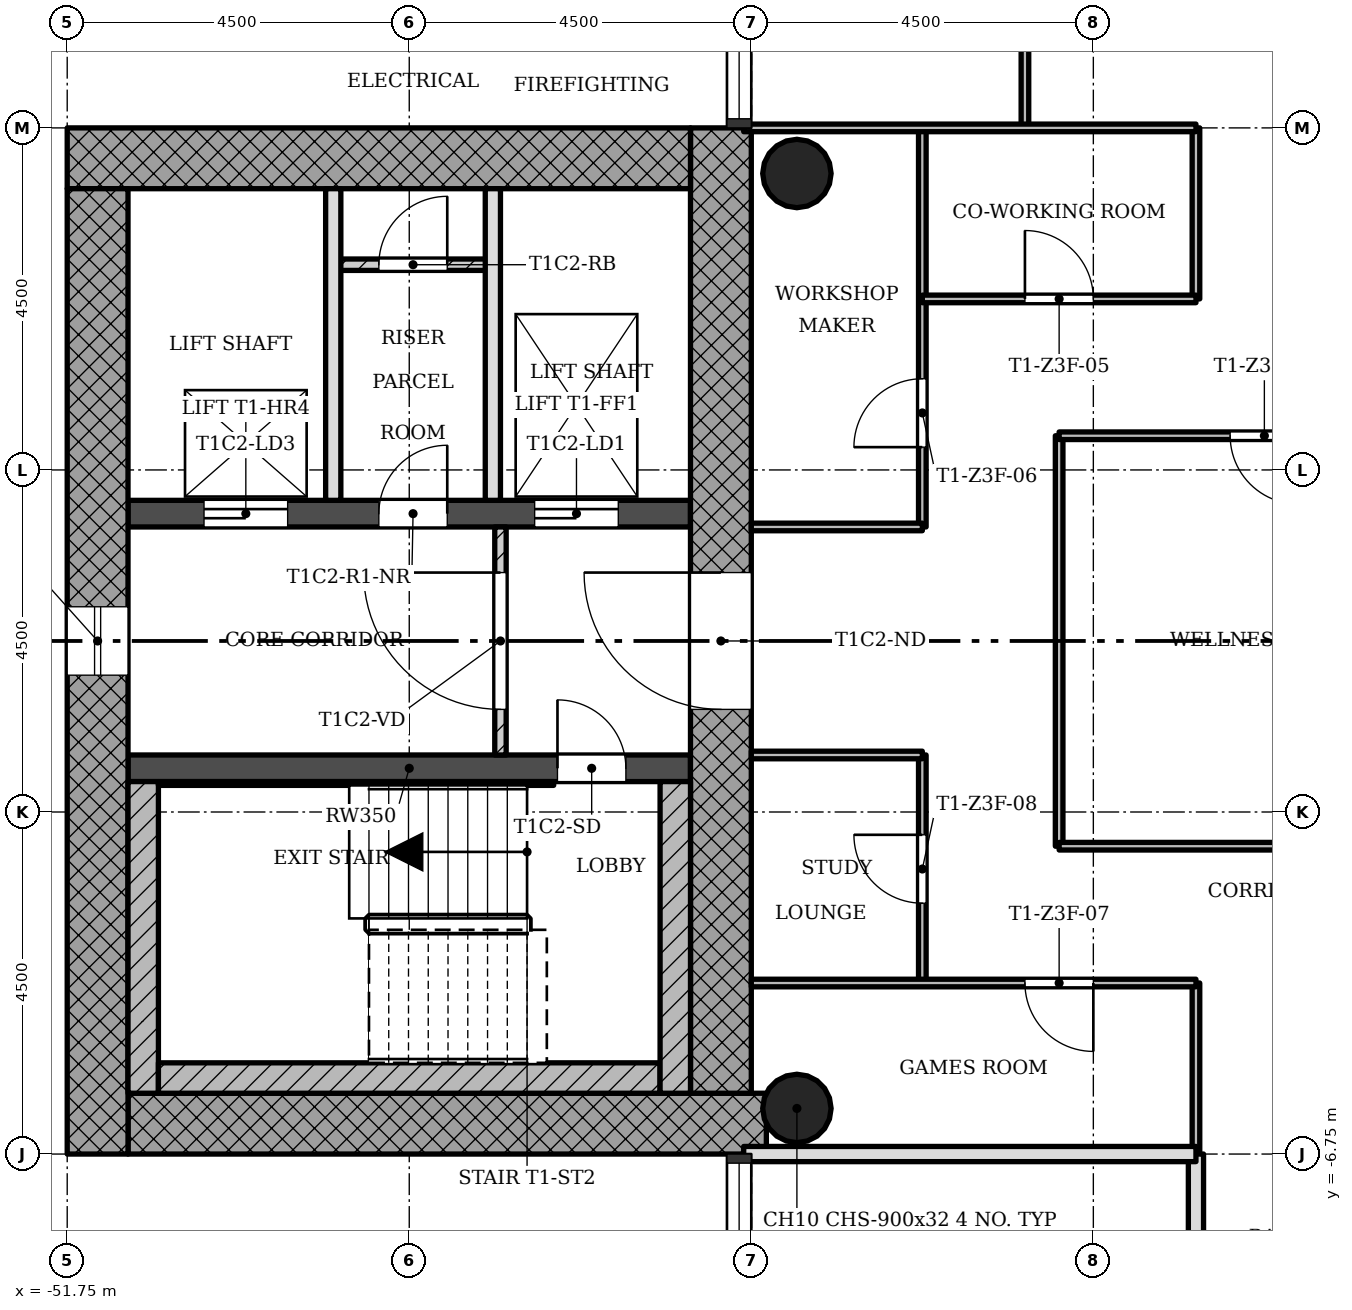
"""IFC4 building model, lengths in metres.
Left out: names, types, materials, properties, quantities, classifications, styles, units other than length and angle.
Written with IfcOpenShell. Run it as: python <this file> out.ifc"""

import sys

from ifc_helpers import new_model, si_unit, direction, frame, frame_2d, origin, origin_2d, place, context, subcontext, project, spatial, rectangle, hollow_circle, extrude, element, fill, save


model = new_model("IFC4")
c1 = context("Model", 3, precision=1e-05, world=origin(), true_north=direction((0.0, 1.0)))
c2 = subcontext(c1, "Body", "Model", "MODEL_VIEW")
j1 = project(units=[si_unit("LENGTHUNIT", "METRE"), si_unit("PLANEANGLEUNIT", "RADIAN")], contexts=[c1])
p1 = place(None, origin())
s1 = spatial("IfcSite", under=j1, at=p1, CompositionType="ELEMENT")
p2 = place(p1, origin())
s2 = spatial("IfcBuilding", under=s1, at=p2, CompositionType="ELEMENT")
p3 = place(p2, frame((0.0, 0.0, 171.1)))
s3 = spatial("IfcBuildingStorey", under=s2, at=p3, CompositionType="ELEMENT", Elevation=171.1)
p4 = place(p3, frame((-50.95, -6.35, 0.0), z_axis=(0.0, 0.0, 1.0), x_axis=(1.0, 0.0, 0.0)))
e1 = element("IfcWall", 1, at=p4, inside=s3, PredefinedType="SHEAR", context=c2, shape_type="SweptSolid", body=[
    extrude(rectangle(XDim=8.398, YDim=0.8, at=frame_2d((4.199, 0.0))), origin(), (0.0, 0.0, 1.0), 3.4),
])
p5 = place(p3, frame((-43.15, -5.95, 0.0), z_axis=(0.0, 0.0, 1.0), x_axis=(0.0, 1.0, 0.0)))
e2 = element("IfcWall", 2, at=p5, inside=s3, PredefinedType="SHEAR", context=c2, shape_type="SweptSolid", body=[
    extrude(rectangle(XDim=12.7, YDim=0.8, at=frame_2d((6.35, 0.0))), origin(), (0.0, 0.0, 1.0), 3.4),
])
p6 = place(p5, frame((5.05, 0.0, 0.0)))
e3 = element("IfcOpeningElement", 3, at=p6, cuts=e2, PredefinedType="OPENING", context=c2, shape_type="SweptSolid", body=[
    extrude(rectangle(XDim=1.8, YDim=2.1, at=frame_2d((0.9, 1.05))), frame((0.0, 0.41, 0.0), z_axis=(0.0, -1.0, 0.0), x_axis=(1.0, 0.0, 0.0)), (0.0, 0.0, 1.0), 0.82),
])
p7 = place(p3, frame((-43.55, 6.35, 0.0), z_axis=(0.0, 0.0, 1.0), x_axis=(-1.0, 0.0, 0.0)))
e4 = element("IfcWall", 4, at=p7, inside=s3, PredefinedType="SHEAR", context=c2, shape_type="SweptSolid", body=[
    extrude(rectangle(XDim=8.2, YDim=0.8, at=frame_2d((4.1, 0.0))), origin(), (0.0, 0.0, 1.0), 3.4),
])
p8 = place(p3, frame((-51.35, 5.95, 0.0), z_axis=(0.0, 0.0, 1.0), x_axis=(0.0, -1.0, 0.0)))
e5 = element("IfcWall", 5, at=p8, inside=s3, PredefinedType="SHEAR", context=c2, shape_type="SweptSolid", body=[
    extrude(rectangle(XDim=12.7, YDim=0.8, at=frame_2d((6.35, 0.0))), origin(), (0.0, 0.0, 1.0), 3.4),
])
p9 = place(p8, frame((5.5, 0.0, 0.45)))
e6 = element("IfcOpeningElement", 6, at=p9, cuts=e5, PredefinedType="OPENING", context=c2, shape_type="SweptSolid", body=[
    extrude(rectangle(XDim=0.9, YDim=2.4, at=frame_2d((0.45, 1.2))), frame((0.0, 0.41, 0.0), z_axis=(0.0, -1.0, 0.0), x_axis=(1.0, 0.0, 0.0)), (0.0, 0.0, 1.0), 0.82),
])
p10 = place(p3, frame((-50.95, -1.675, 0.0), z_axis=(0.0, 0.0, 1.0), x_axis=(1.0, 0.0, 0.0)))
e7 = element("IfcWall", 7, at=p10, inside=s3, PredefinedType="SHEAR", context=c2, shape_type="SweptSolid", body=[
    extrude(rectangle(XDim=7.4, YDim=0.35, at=frame_2d((3.7, 0.0))), origin(), (0.0, 0.0, 1.0), 3.4),
])
p11 = place(p10, frame((5.65, 0.0, 0.0)))
e8 = element("IfcOpeningElement", 8, at=p11, cuts=e7, PredefinedType="OPENING", context=c2, shape_type="SweptSolid", body=[
    extrude(rectangle(XDim=0.9, YDim=2.1, at=frame_2d((0.45, 1.05))), frame((0.0, 0.185, 0.0), z_axis=(0.0, -1.0, 0.0), x_axis=(1.0, 0.0, 0.0)), (0.0, 0.0, 1.0), 0.37),
])
p12 = place(p3, frame((-50.95, 1.675, 0.0), z_axis=(0.0, 0.0, 1.0), x_axis=(1.0, 0.0, 0.0)))
e9 = element("IfcWall", 9, at=p12, inside=s3, PredefinedType="SHEAR", context=c2, shape_type="SweptSolid", body=[
    extrude(rectangle(XDim=7.4, YDim=0.35, at=frame_2d((3.7, 0.0))), origin(), (0.0, 0.0, 1.0), 3.4),
])
p13 = place(p12, frame((5.35, 0.0, 0.0)))
e10 = element("IfcOpeningElement", 10, at=p13, cuts=e9, PredefinedType="OPENING", context=c2, shape_type="SweptSolid", body=[
    extrude(rectangle(XDim=1.1, YDim=2.1, at=frame_2d((0.55, 1.05))), frame((0.0, 0.185, 0.0), z_axis=(0.0, -1.0, 0.0), x_axis=(1.0, 0.0, 0.0)), (0.0, 0.0, 1.0), 0.37),
])
p14 = place(p12, frame((1.0, 0.0, 0.0)))
e11 = element("IfcOpeningElement", 11, at=p14, cuts=e9, PredefinedType="OPENING", context=c2, shape_type="SweptSolid", body=[
    extrude(rectangle(XDim=1.1, YDim=2.1, at=frame_2d((0.55, 1.05))), frame((0.0, 0.185, 0.0), z_axis=(0.0, -1.0, 0.0), x_axis=(1.0, 0.0, 0.0)), (0.0, 0.0, 1.0), 0.37),
])
p15 = place(p12, frame((3.3, 0.0, 0.0)))
e12 = element("IfcOpeningElement", 12, at=p15, cuts=e9, PredefinedType="OPENING", context=c2, shape_type="SweptSolid", body=[
    extrude(rectangle(XDim=0.9, YDim=2.1, at=frame_2d((0.45, 1.05))), frame((0.0, 0.185, 0.0), z_axis=(0.0, -1.0, 0.0), x_axis=(1.0, 0.0, 0.0)), (0.0, 0.0, 1.0), 0.37),
])
for number, where, z_axis, x_axis in (
    (13, (-42.15, -6.15, 0.0), (0.0, 0.0, 1.0), (1.0, 0.0, 0.0)),
    (14, (-42.15, 6.15, 0.0), (0.0, 0.0, 1.0), (1.0, 0.0, 0.0)),
):
    element("IfcColumn", number, at=place(p3, frame(where, z_axis=z_axis, x_axis=x_axis)), inside=s3, PredefinedType="COLUMN", context=c2, shape_type="SweptSolid", body=[
        extrude(hollow_circle(Radius=0.45, WallThickness=0.032, at=origin_2d()), origin(), (0.0, 0.0, 1.0), 3.4),
    ])
p16 = place(p3, frame((-46.05, 1.5, 0.0), z_axis=(0.0, 0.0, 1.0), x_axis=(0.0, -1.0, 0.0)))
e15 = element("IfcWall", 15, at=p16, inside=s3, PredefinedType="PARTITIONING", context=c2, shape_type="SweptSolid", body=[
    extrude(rectangle(XDim=3.0, YDim=0.15, at=frame_2d((1.5, 0.0))), origin(), (0.0, 0.0, 1.0), 3.0),
])
p17 = place(p16, frame((0.6, 0.0, 0.0)))
e16 = element("IfcOpeningElement", 16, at=p17, cuts=e15, PredefinedType="OPENING", context=c2, shape_type="SweptSolid", body=[
    extrude(rectangle(XDim=1.8, YDim=2.1, at=frame_2d((0.9, 1.05))), frame((0.0, 0.085, 0.0), z_axis=(0.0, -1.0, 0.0), x_axis=(1.0, 0.0, 0.0)), (0.0, 0.0, 1.0), 0.17),
])
for number, where, z_axis, x_axis in (
    (17, (-48.25, 5.95, 0.0), (0.0, 0.0, 1.0), (0.0, -1.0, 0.0)),
    (18, (-46.15, 5.95, 0.0), (0.0, 0.0, 1.0), (0.0, -1.0, 0.0)),
):
    element("IfcWall", number, at=place(p3, frame(where, z_axis=z_axis, x_axis=x_axis)), inside=s3, PredefinedType="SOLIDWALL", context=c2, shape_type="SweptSolid", body=[
        extrude(rectangle(XDim=4.1, YDim=0.2, at=frame_2d((2.05, 0.0))), origin(), (0.0, 0.0, 1.0), 3.0),
    ])
p18 = place(p3, frame((-46.15, 4.95, 0.0), z_axis=(0.0, 0.0, 1.0), x_axis=(-1.0, 0.0, 0.0)))
e19 = element("IfcWall", 19, at=p18, inside=s3, PredefinedType="PARTITIONING", context=c2, shape_type="SweptSolid", body=[
    extrude(rectangle(XDim=2.1, YDim=0.15, at=frame_2d((1.05, 0.0))), origin(), (0.0, 0.0, 1.0), 3.0),
])
p19 = place(p18, frame((0.6, 0.0, 0.0)))
e20 = element("IfcOpeningElement", 20, at=p19, cuts=e19, PredefinedType="OPENING", context=c2, shape_type="SweptSolid", body=[
    extrude(rectangle(XDim=0.9, YDim=2.1, at=frame_2d((0.45, 1.05))), frame((0.0, 0.085, 0.0), z_axis=(0.0, -1.0, 0.0), x_axis=(1.0, 0.0, 0.0)), (0.0, 0.0, 1.0), 0.17),
])
p20 = place(p3, frame((-40.5, -4.5, 0.0), z_axis=(0.0, 0.0, 1.0), x_axis=(0.0, 1.0, 0.0)))
e21 = element("IfcWall", 21, at=p20, inside=s3, PredefinedType="PARTITIONING", context=c2, shape_type="SweptSolid", body=[
    extrude(rectangle(XDim=3.0, YDim=0.1, at=frame_2d((1.5, 0.0))), origin(), (0.0, 0.0, 1.0), 3.0),
])
p21 = place(p20, frame((1.05, 0.0, 0.0)))
e22 = element("IfcOpeningElement", 22, at=p21, cuts=e21, PredefinedType="OPENING", context=c2, shape_type="SweptSolid", body=[
    extrude(rectangle(XDim=0.9, YDim=2.1, at=frame_2d((0.45, 1.05))), frame((0.0, 0.06, 0.0), z_axis=(0.0, -1.0, 0.0), x_axis=(1.0, 0.0, 0.0)), (0.0, 0.0, 1.0), 0.12),
])
p22 = place(p3, frame((-40.5, 1.5, 0.0), z_axis=(0.0, 0.0, 1.0), x_axis=(0.0, 1.0, 0.0)))
e23 = element("IfcWall", 23, at=p22, inside=s3, PredefinedType="PARTITIONING", context=c2, shape_type="SweptSolid", body=[
    extrude(rectangle(XDim=5.25, YDim=0.1, at=frame_2d((2.625, 0.0))), origin(), (0.0, 0.0, 1.0), 3.0),
])
p23 = place(p22, frame((1.05, 0.0, 0.0)))
e24 = element("IfcOpeningElement", 24, at=p23, cuts=e23, PredefinedType="OPENING", context=c2, shape_type="SweptSolid", body=[
    extrude(rectangle(XDim=0.9, YDim=2.1, at=frame_2d((0.45, 1.05))), frame((0.0, 0.06, 0.0), z_axis=(0.0, -1.0, 0.0), x_axis=(1.0, 0.0, 0.0)), (0.0, 0.0, 1.0), 0.12),
])
p24 = place(p3, frame((-39.15, 6.75, 0.0), z_axis=(0.0, 0.0, 1.0), x_axis=(0.0, 1.0, 0.0)))
e25 = element("IfcWall", 25, at=p24, inside=s3, PredefinedType="PARTITIONING", context=c2, shape_type="SweptSolid", body=[
    extrude(rectangle(XDim=4.5, YDim=0.1, at=frame_2d((2.25, 0.0))), origin(), (0.0, 0.0, 1.0), 3.0),
])
p25 = place(p24, frame((1.8, 0.0, 0.0)))
e26 = element("IfcOpeningElement", 26, at=p25, cuts=e25, PredefinedType="OPENING", context=c2, shape_type="SweptSolid", body=[
    extrude(rectangle(XDim=0.9, YDim=2.1, at=frame_2d((0.45, 1.05))), frame((0.0, 0.06, 0.0), z_axis=(0.0, -1.0, 0.0), x_axis=(1.0, 0.0, 0.0)), (0.0, 0.0, 1.0), 0.12),
])
p26 = place(p3, frame((-38.7, -2.7, 0.0), z_axis=(0.0, 0.0, 1.0), x_axis=(0.0, 1.0, 0.0)))
e27 = element("IfcWall", 27, at=p26, inside=s3, PredefinedType="PARTITIONING", context=c2, shape_type="SweptSolid", body=[
    extrude(rectangle(XDim=5.4, YDim=0.1, at=frame_2d((2.7, 0.0))), origin(), (0.0, 0.0, 1.0), 3.0),
])
for number, where, z_axis, x_axis in (
    (28, (-36.9, -6.75, 0.0), (0.0, 0.0, 1.0), (0.0, 1.0, 0.0)),
    (29, (-36.9, 4.5, 0.0), (0.0, 0.0, 1.0), (0.0, 1.0, 0.0)),
):
    element("IfcWall", number, at=place(p3, frame(where, z_axis=z_axis, x_axis=x_axis)), inside=s3, PredefinedType="PARTITIONING", context=c2, shape_type="SweptSolid", body=[
        extrude(rectangle(XDim=2.25, YDim=0.1, at=frame_2d((1.125, 0.0))), origin(), (0.0, 0.0, 1.0), 3.0),
    ])
p27 = place(p3, frame((-36.9, -8.55, 0.0), z_axis=(0.0, 0.0, 1.0), x_axis=(0.0, 1.0, 0.0)))
e30 = element("IfcWall", 30, at=p27, inside=s3, PredefinedType="SOLIDWALL", context=c2, shape_type="SweptSolid", body=[
    extrude(rectangle(XDim=1.8, YDim=0.2, at=frame_2d((0.9, 0.0))), origin(), (0.0, 0.0, 1.0), 3.0),
])
p28 = place(p3, frame((-42.85, -6.75, 0.0), z_axis=(0.0, 0.0, 1.0), x_axis=(1.0, 0.0, 0.0)))
e31 = element("IfcWall", 31, at=p28, inside=s3, PredefinedType="SOLIDWALL", context=c2, shape_type="SweptSolid", body=[
    extrude(rectangle(XDim=5.95, YDim=0.2, at=frame_2d((2.975, 0.0))), origin(), (0.0, 0.0, 1.0), 3.0),
])
p29 = place(p3, frame((-42.75, -4.5, 0.0), z_axis=(0.0, 0.0, 1.0), x_axis=(1.0, 0.0, 0.0)))
e32 = element("IfcWall", 32, at=p29, inside=s3, PredefinedType="PARTITIONING", context=c2, shape_type="SweptSolid", body=[
    extrude(rectangle(XDim=5.85, YDim=0.1, at=frame_2d((2.925, 0.0))), origin(), (0.0, 0.0, 1.0), 3.0),
])
p30 = place(p29, frame((3.6, 0.0, 0.0)))
e33 = element("IfcOpeningElement", 33, at=p30, cuts=e32, PredefinedType="OPENING", context=c2, shape_type="SweptSolid", body=[
    extrude(rectangle(XDim=0.9, YDim=2.1, at=frame_2d((0.45, 1.05))), frame((0.0, 0.06, 0.0), z_axis=(0.0, -1.0, 0.0), x_axis=(1.0, 0.0, 0.0)), (0.0, 0.0, 1.0), 0.12),
])
p31 = place(p3, frame((-38.7, -2.7, 0.0), z_axis=(0.0, 0.0, 1.0), x_axis=(1.0, 0.0, 0.0)))
e34 = element("IfcWall", 34, at=p31, inside=s3, PredefinedType="PARTITIONING", context=c2, shape_type="SweptSolid", body=[
    extrude(rectangle(XDim=5.4, YDim=0.1, at=frame_2d((2.7, 0.0))), origin(), (0.0, 0.0, 1.0), 3.0),
])
for number, where, z_axis, x_axis in (
    (35, (-42.75, -1.5, 0.0), (0.0, 0.0, 1.0), (1.0, 0.0, 0.0)),
    (36, (-42.75, 1.5, 0.0), (0.0, 0.0, 1.0), (1.0, 0.0, 0.0)),
):
    element("IfcWall", number, at=place(p3, frame(where, z_axis=z_axis, x_axis=x_axis)), inside=s3, PredefinedType="PARTITIONING", context=c2, shape_type="SweptSolid", body=[
        extrude(rectangle(XDim=2.25, YDim=0.1, at=frame_2d((1.125, 0.0))), origin(), (0.0, 0.0, 1.0), 3.0),
    ])
p32 = place(p3, frame((-38.7, 2.7, 0.0), z_axis=(0.0, 0.0, 1.0), x_axis=(1.0, 0.0, 0.0)))
e37 = element("IfcWall", 37, at=p32, inside=s3, PredefinedType="PARTITIONING", context=c2, shape_type="SweptSolid", body=[
    extrude(rectangle(XDim=5.4, YDim=0.1, at=frame_2d((2.7, 0.0))), origin(), (0.0, 0.0, 1.0), 3.0),
])
p33 = place(p32, frame((2.25, 0.0, 0.0)))
e38 = element("IfcOpeningElement", 38, at=p33, cuts=e37, PredefinedType="OPENING", context=c2, shape_type="SweptSolid", body=[
    extrude(rectangle(XDim=0.9, YDim=2.1, at=frame_2d((0.45, 1.05))), frame((0.0, 0.06, 0.0), z_axis=(0.0, -1.0, 0.0), x_axis=(1.0, 0.0, 0.0)), (0.0, 0.0, 1.0), 0.12),
])
p34 = place(p3, frame((-40.5, 4.5, 0.0), z_axis=(0.0, 0.0, 1.0), x_axis=(1.0, 0.0, 0.0)))
e39 = element("IfcWall", 39, at=p34, inside=s3, PredefinedType="PARTITIONING", context=c2, shape_type="SweptSolid", body=[
    extrude(rectangle(XDim=3.6, YDim=0.1, at=frame_2d((1.8, 0.0))), origin(), (0.0, 0.0, 1.0), 3.0),
])
p35 = place(p34, frame((1.35, 0.0, 0.0)))
e40 = element("IfcOpeningElement", 40, at=p35, cuts=e39, PredefinedType="OPENING", context=c2, shape_type="SweptSolid", body=[
    extrude(rectangle(XDim=0.9, YDim=2.1, at=frame_2d((0.45, 1.05))), frame((0.0, 0.06, 0.0), z_axis=(0.0, -1.0, 0.0), x_axis=(1.0, 0.0, 0.0)), (0.0, 0.0, 1.0), 0.12),
])
p36 = place(p3, frame((-42.85, 6.75, 0.0), z_axis=(0.0, 0.0, 1.0), x_axis=(1.0, 0.0, 0.0)))
e41 = element("IfcWall", 41, at=p36, inside=s3, PredefinedType="PARTITIONING", context=c2, shape_type="SweptSolid", body=[
    extrude(rectangle(XDim=5.95, YDim=0.1, at=frame_2d((2.975, 0.0))), origin(), (0.0, 0.0, 1.0), 3.0),
])
p37 = place(p3, frame((-50.75, -1.85, 0.0), z_axis=(0.0, 0.0, 1.0), x_axis=(0.0, -1.0, 0.0)))
e42 = element("IfcWall", 42, at=p37, inside=s3, PredefinedType="SHEAR", context=c2, shape_type="SweptSolid", body=[
    extrude(rectangle(XDim=4.1, YDim=0.4, at=frame_2d((2.05, 0.0))), origin(), (0.0, 0.0, 1.0), 3.4),
])
p38 = place(p3, frame((-43.95, -5.75, 0.0), z_axis=(0.0, 0.0, 1.0), x_axis=(-1.0, 0.0, 0.0)))
e43 = element("IfcWall", 43, at=p38, inside=s3, PredefinedType="SHEAR", context=c2, shape_type="SweptSolid", body=[
    extrude(rectangle(XDim=6.6, YDim=0.4, at=frame_2d((3.3, 0.0))), origin(), (0.0, 0.0, 1.0), 3.4),
])
p39 = place(p3, frame((-43.75, -1.85, 0.0), z_axis=(0.0, 0.0, 1.0), x_axis=(0.0, -1.0, 0.0)))
e44 = element("IfcWall", 44, at=p39, inside=s3, PredefinedType="SHEAR", context=c2, shape_type="SweptSolid", body=[
    extrude(rectangle(XDim=4.1, YDim=0.4, at=frame_2d((2.05, 0.0))), origin(), (0.0, 0.0, 1.0), 3.4),
])
p40 = place(p3, frame((-45.35, -1.875, 0.0), z_axis=(0.0, 0.0, 1.0), x_axis=(-1.0, 0.0, 0.0)))
e45 = element("IfcWall", 45, at=p40, inside=s3, PredefinedType="SHEAR", context=c2, shape_type="SweptSolid", body=[
    extrude(rectangle(XDim=5.2, YDim=0.05, at=frame_2d((2.6, 0.0))), origin(), (0.0, 0.0, 1.0), 3.4),
])
p41 = place(p9, origin())
e46 = element("IfcWindow", 46, at=p41, inside=s3, PartitioningType="SINGLE_PANEL", PredefinedType="WINDOW", context=c2, shape_type="SweptSolid", body=[
    extrude(rectangle(XDim=0.9, YDim=2.4, at=frame_2d((0.45, 1.2))), frame((0.0, 0.03, 0.0), z_axis=(0.0, -1.0, 0.0), x_axis=(1.0, 0.0, 0.0)), (0.0, 0.0, 1.0), 0.06),
])
fill(e6, e46)
p42 = place(p17, origin())
e47 = element("IfcDoor", 47, at=p42, inside=s3, OperationType="SINGLE_SWING_LEFT", PredefinedType="DOOR", context=c2, shape_type="SweptSolid", body=[
    extrude(rectangle(XDim=1.8, YDim=2.1, at=frame_2d((0.9, 1.05))), frame((0.0, 0.025, 0.0), z_axis=(0.0, -1.0, 0.0), x_axis=(1.0, 0.0, 0.0)), (0.0, 0.0, 1.0), 0.05),
])
fill(e16, e47)
p43 = place(p19, origin())
e48 = element("IfcDoor", 48, at=p43, inside=s3, OperationType="SINGLE_SWING_LEFT", PredefinedType="DOOR", context=c2, shape_type="SweptSolid", body=[
    extrude(rectangle(XDim=0.9, YDim=2.1, at=frame_2d((0.45, 1.05))), frame((0.0, 0.025, 0.0), z_axis=(0.0, -1.0, 0.0), x_axis=(1.0, 0.0, 0.0)), (0.0, 0.0, 1.0), 0.05),
])
fill(e20, e48)
p44 = place(p33, origin())
e49 = element("IfcDoor", 49, at=p44, inside=s3, OperationType="SINGLE_SWING_RIGHT", PredefinedType="DOOR", context=c2, shape_type="SweptSolid", body=[
    extrude(rectangle(XDim=0.9, YDim=2.1, at=frame_2d((0.45, 1.05))), frame((0.0, 0.025, 0.0), z_axis=(0.0, -1.0, 0.0), x_axis=(1.0, 0.0, 0.0)), (0.0, 0.0, 1.0), 0.05),
])
fill(e38, e49)
p45 = place(p35, origin())
e50 = element("IfcDoor", 50, at=p45, inside=s3, OperationType="SINGLE_SWING_RIGHT", PredefinedType="DOOR", context=c2, shape_type="SweptSolid", body=[
    extrude(rectangle(XDim=0.9, YDim=2.1, at=frame_2d((0.45, 1.05))), frame((0.0, 0.025, 0.0), z_axis=(0.0, -1.0, 0.0), x_axis=(1.0, 0.0, 0.0)), (0.0, 0.0, 1.0), 0.05),
])
fill(e40, e50)
p46 = place(p23, origin())
e51 = element("IfcDoor", 51, at=p46, inside=s3, OperationType="SINGLE_SWING_RIGHT", PredefinedType="DOOR", context=c2, shape_type="SweptSolid", body=[
    extrude(rectangle(XDim=0.9, YDim=2.1, at=frame_2d((0.45, 1.05))), frame((0.0, 0.025, 0.0), z_axis=(0.0, -1.0, 0.0), x_axis=(1.0, 0.0, 0.0)), (0.0, 0.0, 1.0), 0.05),
])
fill(e24, e51)
p47 = place(p30, origin())
e52 = element("IfcDoor", 52, at=p47, inside=s3, OperationType="SINGLE_SWING_RIGHT", PredefinedType="DOOR", context=c2, shape_type="SweptSolid", body=[
    extrude(rectangle(XDim=0.9, YDim=2.1, at=frame_2d((0.45, 1.05))), frame((0.0, 0.025, 0.0), z_axis=(0.0, -1.0, 0.0), x_axis=(1.0, 0.0, 0.0)), (0.0, 0.0, 1.0), 0.05),
])
fill(e33, e52)
p48 = place(p21, origin())
e53 = element("IfcDoor", 53, at=p48, inside=s3, OperationType="SINGLE_SWING_LEFT", PredefinedType="DOOR", context=c2, shape_type="SweptSolid", body=[
    extrude(rectangle(XDim=0.9, YDim=2.1, at=frame_2d((0.45, 1.05))), frame((0.0, 0.025, 0.0), z_axis=(0.0, -1.0, 0.0), x_axis=(1.0, 0.0, 0.0)), (0.0, 0.0, 1.0), 0.05),
])
fill(e22, e53)
p49 = place(p11, origin())
e54 = element("IfcDoor", 54, at=p49, inside=s3, OperationType="SINGLE_SWING_RIGHT", PredefinedType="DOOR", context=c2, shape_type="SweptSolid", body=[
    extrude(rectangle(XDim=0.9, YDim=2.1, at=frame_2d((0.45, 1.05))), frame((0.0, 0.025, 0.0), z_axis=(0.0, -1.0, 0.0), x_axis=(1.0, 0.0, 0.0)), (0.0, 0.0, 1.0), 0.05),
])
fill(e8, e54)
p50 = place(p13, origin())
e55 = element("IfcDoor", 55, at=p50, inside=s3, OperationType="SLIDING_TO_LEFT", PredefinedType="DOOR", context=c2, shape_type="SweptSolid", body=[
    extrude(rectangle(XDim=1.1, YDim=2.1, at=frame_2d((0.55, 1.05))), frame((0.0, 0.025, 0.0), z_axis=(0.0, -1.0, 0.0), x_axis=(1.0, 0.0, 0.0)), (0.0, 0.0, 1.0), 0.05),
])
fill(e10, e55)
p51 = place(p14, origin())
e56 = element("IfcDoor", 56, at=p51, inside=s3, OperationType="SLIDING_TO_LEFT", PredefinedType="DOOR", context=c2, shape_type="SweptSolid", body=[
    extrude(rectangle(XDim=1.1, YDim=2.1, at=frame_2d((0.55, 1.05))), frame((0.0, 0.025, 0.0), z_axis=(0.0, -1.0, 0.0), x_axis=(1.0, 0.0, 0.0)), (0.0, 0.0, 1.0), 0.05),
])
fill(e11, e56)
p52 = place(p15, origin())
e57 = element("IfcDoor", 57, at=p52, inside=s3, OperationType="SINGLE_SWING_LEFT", PredefinedType="DOOR", context=c2, shape_type="SweptSolid", body=[
    extrude(rectangle(XDim=0.9, YDim=2.1, at=frame_2d((0.45, 1.05))), frame((0.0, 0.025, 0.0), z_axis=(0.0, -1.0, 0.0), x_axis=(1.0, 0.0, 0.0)), (0.0, 0.0, 1.0), 0.05),
])
fill(e12, e57)
p53 = place(p6, origin())
e58 = element("IfcDoor", 58, at=p53, inside=s3, OperationType="SINGLE_SWING_LEFT", PredefinedType="DOOR", context=c2, shape_type="SweptSolid", body=[
    extrude(rectangle(XDim=1.8, YDim=2.1, at=frame_2d((0.9, 1.05))), frame((0.0, 0.025, 0.0), z_axis=(0.0, -1.0, 0.0), x_axis=(1.0, 0.0, 0.0)), (0.0, 0.0, 1.0), 0.05),
])
fill(e3, e58)
save(model, sys.argv[1])
